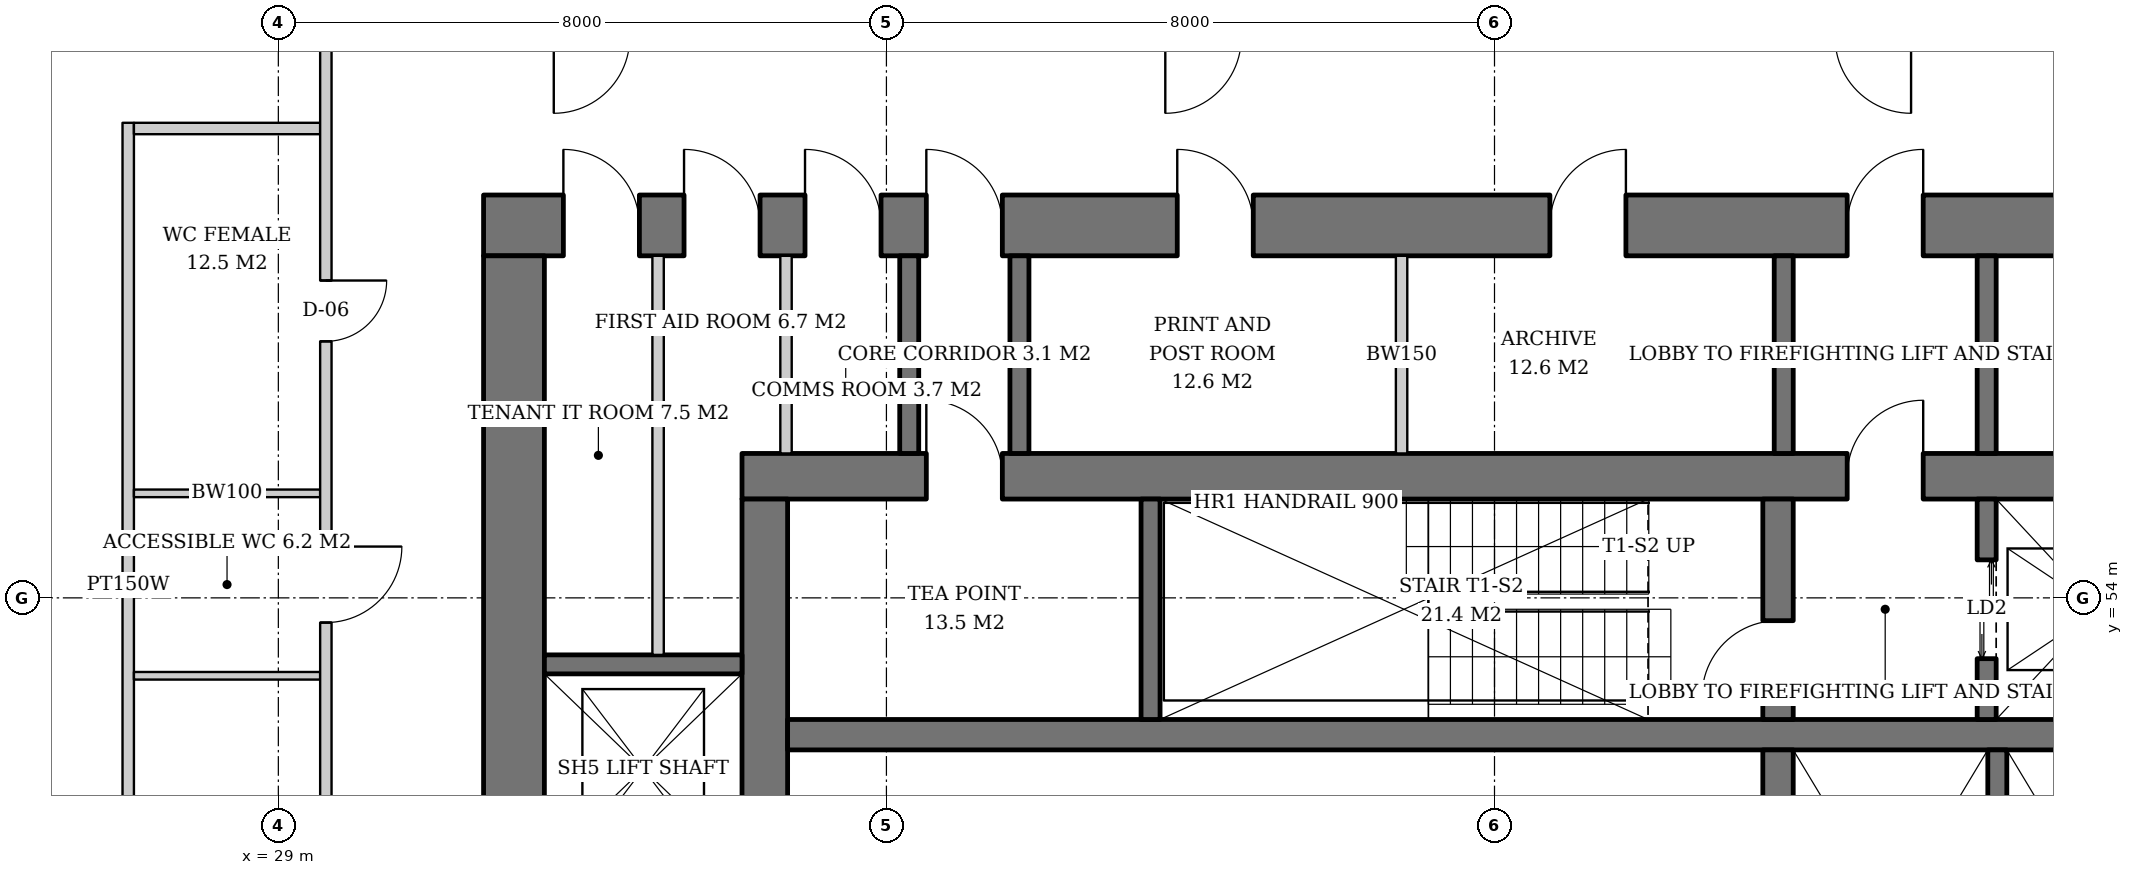
"""IFC4 building model, lengths in metres.
Left out: names, types, materials, properties, quantities, classifications, styles, units other than length and angle.
Written with IfcOpenShell. Run it as: python <this file> out.ifc"""

import sys

from ifc_helpers import new_model, si_unit, direction, frame, frame_2d, origin, place, context, subcontext, project, spatial, rectangle, extrude, element, fill, save


model = new_model("IFC4")
c1 = context("Model", 3, precision=1e-05, world=origin(), true_north=direction((0.0, 1.0)))
c2 = subcontext(c1, "Body", "Model", "MODEL_VIEW")
j1 = project(units=[si_unit("LENGTHUNIT", "METRE"), si_unit("PLANEANGLEUNIT", "RADIAN")], contexts=[c1])
p1 = place(None, origin())
s1 = spatial("IfcSite", under=j1, at=p1, CompositionType="ELEMENT")
p2 = place(p1, origin())
s2 = spatial("IfcBuilding", under=s1, at=p2, CompositionType="ELEMENT")
p3 = place(p2, frame((0.0, 0.0, 40.0)))
s3 = spatial("IfcBuildingStorey", under=s2, at=p3, CompositionType="ELEMENT", Elevation=40.0)
p4 = place(p3, frame((35.1, 55.6, 0.0), z_axis=(0.0, 0.0, 1.0), x_axis=(1.0, 0.0, 0.0)))
e1 = element("IfcWall", 1, at=p4, inside=s3, PredefinedType="SHEAR", context=c2, shape_type="SweptSolid", body=[
    extrude(rectangle(XDim=19.8, YDim=0.6, at=frame_2d((9.9, 0.0))), origin(), (0.0, 0.0, 1.0), 3.8),
])
p5 = place(p4, frame((14.54, 0.0, 0.0)))
e2 = element("IfcOpeningElement", 2, at=p5, cuts=e1, PredefinedType="OPENING", context=c2, shape_type="SweptSolid", body=[
    extrude(rectangle(XDim=1.0, YDim=2.1, at=frame_2d((0.5, 1.05))), frame((0.0, 0.31, 0.0), z_axis=(0.0, -1.0, 0.0), x_axis=(1.0, 0.0, 0.0)), (0.0, 0.0, 1.0), 0.62),
])
p6 = place(p4, frame((2.425, 0.0, 0.0)))
e3 = element("IfcOpeningElement", 3, at=p6, cuts=e1, PredefinedType="OPENING", context=c2, shape_type="SweptSolid", body=[
    extrude(rectangle(XDim=1.0, YDim=2.1, at=frame_2d((0.5, 1.05))), frame((0.0, 0.31, 0.0), z_axis=(0.0, -1.0, 0.0), x_axis=(1.0, 0.0, 0.0)), (0.0, 0.0, 1.0), 0.62),
])
p7 = place(p3, frame((35.4, 36.7, 0.0), z_axis=(0.0, 0.0, 1.0), x_axis=(0.0, 1.0, 0.0)))
e4 = element("IfcWall", 4, at=p7, inside=s3, PredefinedType="SHEAR", context=c2, shape_type="SweptSolid", body=[
    extrude(rectangle(XDim=18.6, YDim=0.6, at=frame_2d((9.3, 0.0))), origin(), (0.0, 0.0, 1.0), 3.8),
])
p8 = place(p7, frame((8.4, 0.0, 0.0)))
e5 = element("IfcOpeningElement", 5, at=p8, cuts=e4, PredefinedType="OPENING", context=c2, shape_type="SweptSolid", body=[
    extrude(rectangle(XDim=1.8, YDim=2.4, at=frame_2d((0.9, 1.2))), frame((0.0, 0.31, 0.0), z_axis=(0.0, -1.0, 0.0), x_axis=(1.0, 0.0, 0.0)), (0.0, 0.0, 1.0), 0.62),
])
p9 = place(p3, frame((31.7, 58.9, 0.0), z_axis=(0.0, 0.0, 1.0), x_axis=(1.0, 0.0, 0.0)))
e6 = element("IfcWall", 6, at=p9, inside=s3, PredefinedType="SHEAR", context=c2, shape_type="SweptSolid", body=[
    extrude(rectangle(XDim=26.6, YDim=0.8, at=frame_2d((13.3, 0.0))), origin(), (0.0, 0.0, 1.0), 3.8),
])
p10 = place(p9, frame((17.94, 0.0, 0.0)))
e7 = element("IfcOpeningElement", 7, at=p10, cuts=e6, PredefinedType="OPENING", context=c2, shape_type="SweptSolid", body=[
    extrude(rectangle(XDim=1.0, YDim=2.1, at=frame_2d((0.5, 1.05))), frame((0.0, 0.41, 0.0), z_axis=(0.0, -1.0, 0.0), x_axis=(1.0, 0.0, 0.0)), (0.0, 0.0, 1.0), 0.82),
])
p11 = place(p9, frame((5.825, 0.0, 0.0)))
e8 = element("IfcOpeningElement", 8, at=p11, cuts=e6, PredefinedType="OPENING", context=c2, shape_type="SweptSolid", body=[
    extrude(rectangle(XDim=1.0, YDim=2.1, at=frame_2d((0.5, 1.05))), frame((0.0, 0.41, 0.0), z_axis=(0.0, -1.0, 0.0), x_axis=(1.0, 0.0, 0.0)), (0.0, 0.0, 1.0), 0.82),
])
p12 = place(p9, frame((1.05, 0.0, 0.0)))
e9 = element("IfcOpeningElement", 9, at=p12, cuts=e6, PredefinedType="OPENING", context=c2, shape_type="SweptSolid", body=[
    extrude(rectangle(XDim=1.0, YDim=2.1, at=frame_2d((0.5, 1.05))), frame((0.0, 0.41, 0.0), z_axis=(0.0, -1.0, 0.0), x_axis=(1.0, 0.0, 0.0)), (0.0, 0.0, 1.0), 0.82),
])
p13 = place(p9, frame((2.637, 0.0, 0.0)))
e10 = element("IfcOpeningElement", 10, at=p13, cuts=e6, PredefinedType="OPENING", context=c2, shape_type="SweptSolid", body=[
    extrude(rectangle(XDim=1.0, YDim=2.1, at=frame_2d((0.5, 1.05))), frame((0.0, 0.41, 0.0), z_axis=(0.0, -1.0, 0.0), x_axis=(1.0, 0.0, 0.0)), (0.0, 0.0, 1.0), 0.82),
])
p14 = place(p9, frame((4.229, 0.0, 0.0)))
e11 = element("IfcOpeningElement", 11, at=p14, cuts=e6, PredefinedType="OPENING", context=c2, shape_type="SweptSolid", body=[
    extrude(rectangle(XDim=1.0, YDim=2.1, at=frame_2d((0.5, 1.05))), frame((0.0, 0.41, 0.0), z_axis=(0.0, -1.0, 0.0), x_axis=(1.0, 0.0, 0.0)), (0.0, 0.0, 1.0), 0.82),
])
p15 = place(p9, frame((9.126, 0.0, 0.0)))
e12 = element("IfcOpeningElement", 12, at=p15, cuts=e6, PredefinedType="OPENING", context=c2, shape_type="SweptSolid", body=[
    extrude(rectangle(XDim=1.0, YDim=2.1, at=frame_2d((0.5, 1.05))), frame((0.0, 0.41, 0.0), z_axis=(0.0, -1.0, 0.0), x_axis=(1.0, 0.0, 0.0)), (0.0, 0.0, 1.0), 0.82),
])
p16 = place(p9, frame((14.029, 0.0, 0.0)))
e13 = element("IfcOpeningElement", 13, at=p16, cuts=e6, PredefinedType="OPENING", context=c2, shape_type="SweptSolid", body=[
    extrude(rectangle(XDim=1.0, YDim=2.1, at=frame_2d((0.5, 1.05))), frame((0.0, 0.41, 0.0), z_axis=(0.0, -1.0, 0.0), x_axis=(1.0, 0.0, 0.0)), (0.0, 0.0, 1.0), 0.82),
])
p17 = place(p9, frame((22.35, 0.0, 0.0)))
e14 = element("IfcOpeningElement", 14, at=p17, cuts=e6, PredefinedType="OPENING", context=c2, shape_type="SweptSolid", body=[
    extrude(rectangle(XDim=1.0, YDim=2.1, at=frame_2d((0.5, 1.05))), frame((0.0, 0.41, 0.0), z_axis=(0.0, -1.0, 0.0), x_axis=(1.0, 0.0, 0.0)), (0.0, 0.0, 1.0), 0.82),
])
p18 = place(p3, frame((32.1, 33.5, 0.0), z_axis=(0.0, 0.0, 1.0), x_axis=(0.0, 1.0, 0.0)))
e15 = element("IfcWall", 15, at=p18, inside=s3, PredefinedType="SHEAR", context=c2, shape_type="SweptSolid", body=[
    extrude(rectangle(XDim=25.0, YDim=0.8, at=frame_2d((12.5, 0.0))), origin(), (0.0, 0.0, 1.0), 3.8),
])
p19 = place(p18, frame((11.6, 0.0, 0.0)))
e16 = element("IfcOpeningElement", 16, at=p19, cuts=e15, PredefinedType="OPENING", context=c2, shape_type="SweptSolid", body=[
    extrude(rectangle(XDim=1.8, YDim=2.4, at=frame_2d((0.9, 1.2))), frame((0.0, 0.41, 0.0), z_axis=(0.0, -1.0, 0.0), x_axis=(1.0, 0.0, 0.0)), (0.0, 0.0, 1.0), 0.82),
])
p20 = place(p3, frame((35.7, 52.2, 0.0), z_axis=(0.0, 0.0, 1.0), x_axis=(1.0, 0.0, 0.0)))
e17 = element("IfcWall", 17, at=p20, inside=s3, PredefinedType="SHEAR", context=c2, shape_type="SweptSolid", body=[
    extrude(rectangle(XDim=18.6, YDim=0.4, at=frame_2d((9.3, 0.0))), origin(), (0.0, 0.0, 1.0), 3.8),
])
p21 = place(p3, frame((48.73, 40.0, 0.0), z_axis=(0.0, 0.0, 1.0), x_axis=(0.0, 1.0, 0.0)))
e18 = element("IfcWall", 18, at=p21, inside=s3, PredefinedType="SHEAR", context=c2, shape_type="SweptSolid", body=[
    extrude(rectangle(XDim=12.0, YDim=0.4, at=frame_2d((6.0, 0.0))), origin(), (0.0, 0.0, 1.0), 3.8),
])
p22 = place(p3, frame((48.73, 52.4, 0.0), z_axis=(0.0, 0.0, 1.0), x_axis=(0.0, 1.0, 0.0)))
e19 = element("IfcWall", 19, at=p22, inside=s3, PredefinedType="SHEAR", context=c2, shape_type="SweptSolid", body=[
    extrude(rectangle(XDim=2.9, YDim=0.4, at=frame_2d((1.45, 0.0))), origin(), (0.0, 0.0, 1.0), 3.8),
])
p23 = place(p22, frame((0.3, 0.0, 0.0)))
e20 = element("IfcOpeningElement", 20, at=p23, cuts=e19, PredefinedType="OPENING", context=c2, shape_type="SweptSolid", body=[
    extrude(rectangle(XDim=1.0, YDim=2.1, at=frame_2d((0.5, 1.05))), frame((0.0, 0.21, 0.0), z_axis=(0.0, -1.0, 0.0), x_axis=(1.0, 0.0, 0.0)), (0.0, 0.0, 1.0), 0.42),
])
p24 = place(p3, frame((40.475, 52.4, 0.0), z_axis=(0.0, 0.0, 1.0), x_axis=(0.0, 1.0, 0.0)))
e21 = element("IfcWall", 21, at=p24, inside=s3, PredefinedType="SHEAR", context=c2, shape_type="SweptSolid", body=[
    extrude(rectangle(XDim=2.9, YDim=0.25, at=frame_2d((1.45, 0.0))), origin(), (0.0, 0.0, 1.0), 3.8),
])
p25 = place(p3, frame((51.475, 52.4, 0.0), z_axis=(0.0, 0.0, 1.0), x_axis=(0.0, 1.0, 0.0)))
e22 = element("IfcWall", 22, at=p25, inside=s3, PredefinedType="SHEAR", context=c2, shape_type="SweptSolid", body=[
    extrude(rectangle(XDim=2.9, YDim=0.25, at=frame_2d((1.45, 0.0))), origin(), (0.0, 0.0, 1.0), 3.8),
])
p26 = place(p25, frame((0.8, 0.0, 0.0)))
e23 = element("IfcOpeningElement", 23, at=p26, cuts=e22, PredefinedType="OPENING", context=c2, shape_type="SweptSolid", body=[
    extrude(rectangle(XDim=1.3, YDim=2.2, at=frame_2d((0.65, 1.1))), frame((0.0, 0.135, 0.0), z_axis=(0.0, -1.0, 0.0), x_axis=(1.0, 0.0, 0.0)), (0.0, 0.0, 1.0), 0.27),
])
p27 = place(p3, frame((51.615, 47.75, 0.0), z_axis=(0.0, 0.0, 1.0), x_axis=(0.0, 1.0, 0.0)))
e24 = element("IfcWall", 24, at=p27, inside=s3, PredefinedType="SHEAR", context=c2, shape_type="SweptSolid", body=[
    extrude(rectangle(XDim=4.25, YDim=0.25, at=frame_2d((2.125, 0.0))), origin(), (0.0, 0.0, 1.0), 3.8),
])
p28 = place(p3, frame((32.5, 53.125, 0.0), z_axis=(0.0, 0.0, 1.0), x_axis=(1.0, 0.0, 0.0)))
e25 = element("IfcWall", 25, at=p28, inside=s3, PredefinedType="SHEAR", context=c2, shape_type="SweptSolid", body=[
    extrude(rectangle(XDim=2.6, YDim=0.25, at=frame_2d((1.3, 0.0))), origin(), (0.0, 0.0, 1.0), 3.8),
])
for number, where, z_axis, x_axis in (
    (26, (48.805, 55.9, 0.0), (0.0, 0.0, 1.0), (0.0, 1.0, 0.0)),
    (27, (51.475, 55.9, 0.0), (0.0, 0.0, 1.0), (0.0, 1.0, 0.0)),
    (28, (37.3, 55.9, 0.0), (0.0, 0.0, 1.0), (0.0, 1.0, 0.0)),
    (29, (38.75, 55.9, 0.0), (0.0, 0.0, 1.0), (0.0, 1.0, 0.0)),
):
    element("IfcWall", number, at=place(p3, frame(where, z_axis=z_axis, x_axis=x_axis)), inside=s3, PredefinedType="SOLIDWALL", context=c2, shape_type="SweptSolid", body=[
        extrude(rectangle(XDim=2.6, YDim=0.25, at=frame_2d((1.3, 0.0))), origin(), (0.0, 0.0, 1.0), 3.62),
    ])
p29 = place(p3, frame((33.996, 53.25, 0.0), z_axis=(0.0, 0.0, 1.0), x_axis=(0.0, 1.0, 0.0)))
e30 = element("IfcWall", 30, at=p29, inside=s3, PredefinedType="SOLIDWALL", context=c2, shape_type="SweptSolid", body=[
    extrude(rectangle(XDim=5.25, YDim=0.15, at=frame_2d((2.625, 0.0))), origin(), (0.0, 0.0, 1.0), 3.62),
])
for number, where, z_axis, x_axis in (
    (31, (35.679, 55.9, 0.0), (0.0, 0.0, 1.0), (0.0, 1.0, 0.0)),
    (32, (43.778, 55.9, 0.0), (0.0, 0.0, 1.0), (0.0, 1.0, 0.0)),
):
    element("IfcWall", number, at=place(p3, frame(where, z_axis=z_axis, x_axis=x_axis)), inside=s3, PredefinedType="SOLIDWALL", context=c2, shape_type="SweptSolid", body=[
        extrude(rectangle(XDim=2.6, YDim=0.15, at=frame_2d((1.3, 0.0))), origin(), (0.0, 0.0, 1.0), 3.62),
    ])
p30 = place(p3, frame((27.025, 60.25, 0.0), z_axis=(0.0, 0.0, 1.0), x_axis=(0.0, -1.0, 0.0)))
e33 = element("IfcWall", 33, at=p30, inside=s3, PredefinedType="PARTITIONING", context=c2, shape_type="SweptSolid", body=[
    extrude(rectangle(XDim=12.15, YDim=0.15, at=frame_2d((6.075, 0.0))), origin(), (0.0, 0.0, 1.0), 2.612),
])
p31 = place(p3, frame((29.55, 60.175, 0.0), z_axis=(0.0, 0.0, 1.0), x_axis=(-1.0, 0.0, 0.0)))
e34 = element("IfcWall", 34, at=p31, inside=s3, PredefinedType="PARTITIONING", context=c2, shape_type="SweptSolid", body=[
    extrude(rectangle(XDim=2.45, YDim=0.15, at=frame_2d((1.225, 0.0))), origin(), (0.0, 0.0, 1.0), 3.62),
])
for number, where, z_axis, x_axis in (
    (35, (29.55, 55.375, 0.0), (0.0, 0.0, 1.0), (-1.0, 0.0, 0.0)),
    (36, (29.55, 52.975, 0.0), (0.0, 0.0, 1.0), (-1.0, 0.0, 0.0)),
):
    element("IfcWall", number, at=place(p3, frame(where, z_axis=z_axis, x_axis=x_axis)), inside=s3, PredefinedType="SOLIDWALL", context=c2, shape_type="SweptSolid", body=[
        extrude(rectangle(XDim=2.45, YDim=0.1, at=frame_2d((1.225, 0.0))), origin(), (0.0, 0.0, 1.0), 3.62),
    ])
p32 = place(p3, frame((29.625, 61.45, 0.0), z_axis=(0.0, 0.0, 1.0), x_axis=(0.0, -1.0, 0.0)))
e37 = element("IfcWall", 37, at=p32, inside=s3, PredefinedType="PARTITIONING", context=c2, shape_type="SweptSolid", body=[
    extrude(rectangle(XDim=30.75, YDim=0.15, at=frame_2d((15.375, 0.0))), origin(), (0.0, 0.0, 1.0), 2.612),
])
p33 = place(p32, frame((3.275, 0.0, 0.0)))
e38 = element("IfcOpeningElement", 38, at=p33, cuts=e37, PredefinedType="OPENING", context=c2, shape_type="SweptSolid", body=[
    extrude(rectangle(XDim=0.8, YDim=2.1, at=frame_2d((0.4, 1.05))), frame((0.0, 0.085, 0.0), z_axis=(0.0, -1.0, 0.0), x_axis=(1.0, 0.0, 0.0)), (0.0, 0.0, 1.0), 0.17),
])
p34 = place(p32, frame((6.775, 0.0, 0.0)))
e39 = element("IfcOpeningElement", 39, at=p34, cuts=e37, PredefinedType="OPENING", context=c2, shape_type="SweptSolid", body=[
    extrude(rectangle(XDim=1.0, YDim=2.1, at=frame_2d((0.5, 1.05))), frame((0.0, 0.085, 0.0), z_axis=(0.0, -1.0, 0.0), x_axis=(1.0, 0.0, 0.0)), (0.0, 0.0, 1.0), 0.17),
])
p35 = place(p32, frame((10.475, 0.0, 0.0)))
e40 = element("IfcOpeningElement", 40, at=p35, cuts=e37, PredefinedType="OPENING", context=c2, shape_type="SweptSolid", body=[
    extrude(rectangle(XDim=0.8, YDim=2.1, at=frame_2d((0.4, 1.05))), frame((0.0, 0.085, 0.0), z_axis=(0.0, -1.0, 0.0), x_axis=(1.0, 0.0, 0.0)), (0.0, 0.0, 1.0), 0.17),
])
p36 = place(p26, origin())
e41 = element("IfcDoor", 41, at=p36, inside=s3, OperationType="DOUBLE_DOOR_SLIDING", PredefinedType="DOOR", context=c2, shape_type="SweptSolid", body=[
    extrude(rectangle(XDim=1.3, YDim=2.2, at=frame_2d((0.65, 1.1))), frame((0.0, 0.025, 0.0), z_axis=(0.0, -1.0, 0.0), x_axis=(1.0, 0.0, 0.0)), (0.0, 0.0, 1.0), 0.05),
])
fill(e23, e41)
p37 = place(p23, origin())
e42 = element("IfcDoor", 42, at=p37, inside=s3, OperationType="SINGLE_SWING_LEFT", PredefinedType="DOOR", context=c2, shape_type="SweptSolid", body=[
    extrude(rectangle(XDim=1.0, YDim=2.1, at=frame_2d((0.5, 1.05))), frame((0.0, 0.025, 0.0), z_axis=(0.0, -1.0, 0.0), x_axis=(1.0, 0.0, 0.0)), (0.0, 0.0, 1.0), 0.05),
])
fill(e20, e42)
p38 = place(p5, origin())
e43 = element("IfcDoor", 43, at=p38, inside=s3, OperationType="SINGLE_SWING_RIGHT", PredefinedType="DOOR", context=c2, shape_type="SweptSolid", body=[
    extrude(rectangle(XDim=1.0, YDim=2.1, at=frame_2d((0.5, 1.05))), frame((0.0, 0.025, 0.0), z_axis=(0.0, -1.0, 0.0), x_axis=(1.0, 0.0, 0.0)), (0.0, 0.0, 1.0), 0.05),
])
fill(e2, e43)
p39 = place(p10, origin())
e44 = element("IfcDoor", 44, at=p39, inside=s3, OperationType="SINGLE_SWING_RIGHT", PredefinedType="DOOR", context=c2, shape_type="SweptSolid", body=[
    extrude(rectangle(XDim=1.0, YDim=2.1, at=frame_2d((0.5, 1.05))), frame((0.0, 0.025, 0.0), z_axis=(0.0, -1.0, 0.0), x_axis=(1.0, 0.0, 0.0)), (0.0, 0.0, 1.0), 0.05),
])
fill(e7, e44)
p40 = place(p11, origin())
e45 = element("IfcDoor", 45, at=p40, inside=s3, OperationType="SINGLE_SWING_LEFT", PredefinedType="DOOR", context=c2, shape_type="SweptSolid", body=[
    extrude(rectangle(XDim=1.0, YDim=2.1, at=frame_2d((0.5, 1.05))), frame((0.0, 0.025, 0.0), z_axis=(0.0, -1.0, 0.0), x_axis=(1.0, 0.0, 0.0)), (0.0, 0.0, 1.0), 0.05),
])
fill(e8, e45)
p41 = place(p6, origin())
e46 = element("IfcDoor", 46, at=p41, inside=s3, OperationType="SINGLE_SWING_LEFT", PredefinedType="DOOR", context=c2, shape_type="SweptSolid", body=[
    extrude(rectangle(XDim=1.0, YDim=2.1, at=frame_2d((0.5, 1.05))), frame((0.0, -0.24, 0.0), z_axis=(0.0, -1.0, 0.0), x_axis=(1.0, 0.0, 0.0)), (0.0, 0.0, 1.0), 0.05),
])
fill(e3, e46)
p42 = place(p12, origin())
e47 = element("IfcDoor", 47, at=p42, inside=s3, OperationType="SINGLE_SWING_LEFT", PredefinedType="DOOR", context=c2, shape_type="SweptSolid", body=[
    extrude(rectangle(XDim=1.0, YDim=2.1, at=frame_2d((0.5, 1.05))), frame((0.0, -0.34, 0.0), z_axis=(0.0, -1.0, 0.0), x_axis=(1.0, 0.0, 0.0)), (0.0, 0.0, 1.0), 0.05),
])
fill(e9, e47)
p43 = place(p13, origin())
e48 = element("IfcDoor", 48, at=p43, inside=s3, OperationType="SINGLE_SWING_LEFT", PredefinedType="DOOR", context=c2, shape_type="SweptSolid", body=[
    extrude(rectangle(XDim=1.0, YDim=2.1, at=frame_2d((0.5, 1.05))), frame((0.0, -0.34, 0.0), z_axis=(0.0, -1.0, 0.0), x_axis=(1.0, 0.0, 0.0)), (0.0, 0.0, 1.0), 0.05),
])
fill(e10, e48)
p44 = place(p14, origin())
e49 = element("IfcDoor", 49, at=p44, inside=s3, OperationType="SINGLE_SWING_LEFT", PredefinedType="DOOR", context=c2, shape_type="SweptSolid", body=[
    extrude(rectangle(XDim=1.0, YDim=2.1, at=frame_2d((0.5, 1.05))), frame((0.0, -0.34, 0.0), z_axis=(0.0, -1.0, 0.0), x_axis=(1.0, 0.0, 0.0)), (0.0, 0.0, 1.0), 0.05),
])
fill(e11, e49)
p45 = place(p15, origin())
e50 = element("IfcDoor", 50, at=p45, inside=s3, OperationType="SINGLE_SWING_LEFT", PredefinedType="DOOR", context=c2, shape_type="SweptSolid", body=[
    extrude(rectangle(XDim=1.0, YDim=2.1, at=frame_2d((0.5, 1.05))), frame((0.0, -0.34, 0.0), z_axis=(0.0, -1.0, 0.0), x_axis=(1.0, 0.0, 0.0)), (0.0, 0.0, 1.0), 0.05),
])
fill(e12, e50)
p46 = place(p16, origin())
e51 = element("IfcDoor", 51, at=p46, inside=s3, OperationType="SINGLE_SWING_RIGHT", PredefinedType="DOOR", context=c2, shape_type="SweptSolid", body=[
    extrude(rectangle(XDim=1.0, YDim=2.1, at=frame_2d((0.5, 1.05))), frame((0.0, -0.34, 0.0), z_axis=(0.0, -1.0, 0.0), x_axis=(1.0, 0.0, 0.0)), (0.0, 0.0, 1.0), 0.05),
])
fill(e13, e51)
p47 = place(p33, origin())
e52 = element("IfcDoor", 52, at=p47, inside=s3, OperationType="SINGLE_SWING_LEFT", PredefinedType="DOOR", context=c2, shape_type="SweptSolid", body=[
    extrude(rectangle(XDim=0.8, YDim=2.1, at=frame_2d((0.4, 1.05))), frame((0.0, 0.025, 0.0), z_axis=(0.0, -1.0, 0.0), x_axis=(1.0, 0.0, 0.0)), (0.0, 0.0, 1.0), 0.05),
])
fill(e38, e52)
p48 = place(p34, origin())
e53 = element("IfcDoor", 53, at=p48, inside=s3, OperationType="SINGLE_SWING_LEFT", PredefinedType="DOOR", context=c2, shape_type="SweptSolid", body=[
    extrude(rectangle(XDim=1.0, YDim=2.1, at=frame_2d((0.5, 1.05))), frame((0.0, 0.025, 0.0), z_axis=(0.0, -1.0, 0.0), x_axis=(1.0, 0.0, 0.0)), (0.0, 0.0, 1.0), 0.05),
])
fill(e39, e53)
save(model, sys.argv[1])
